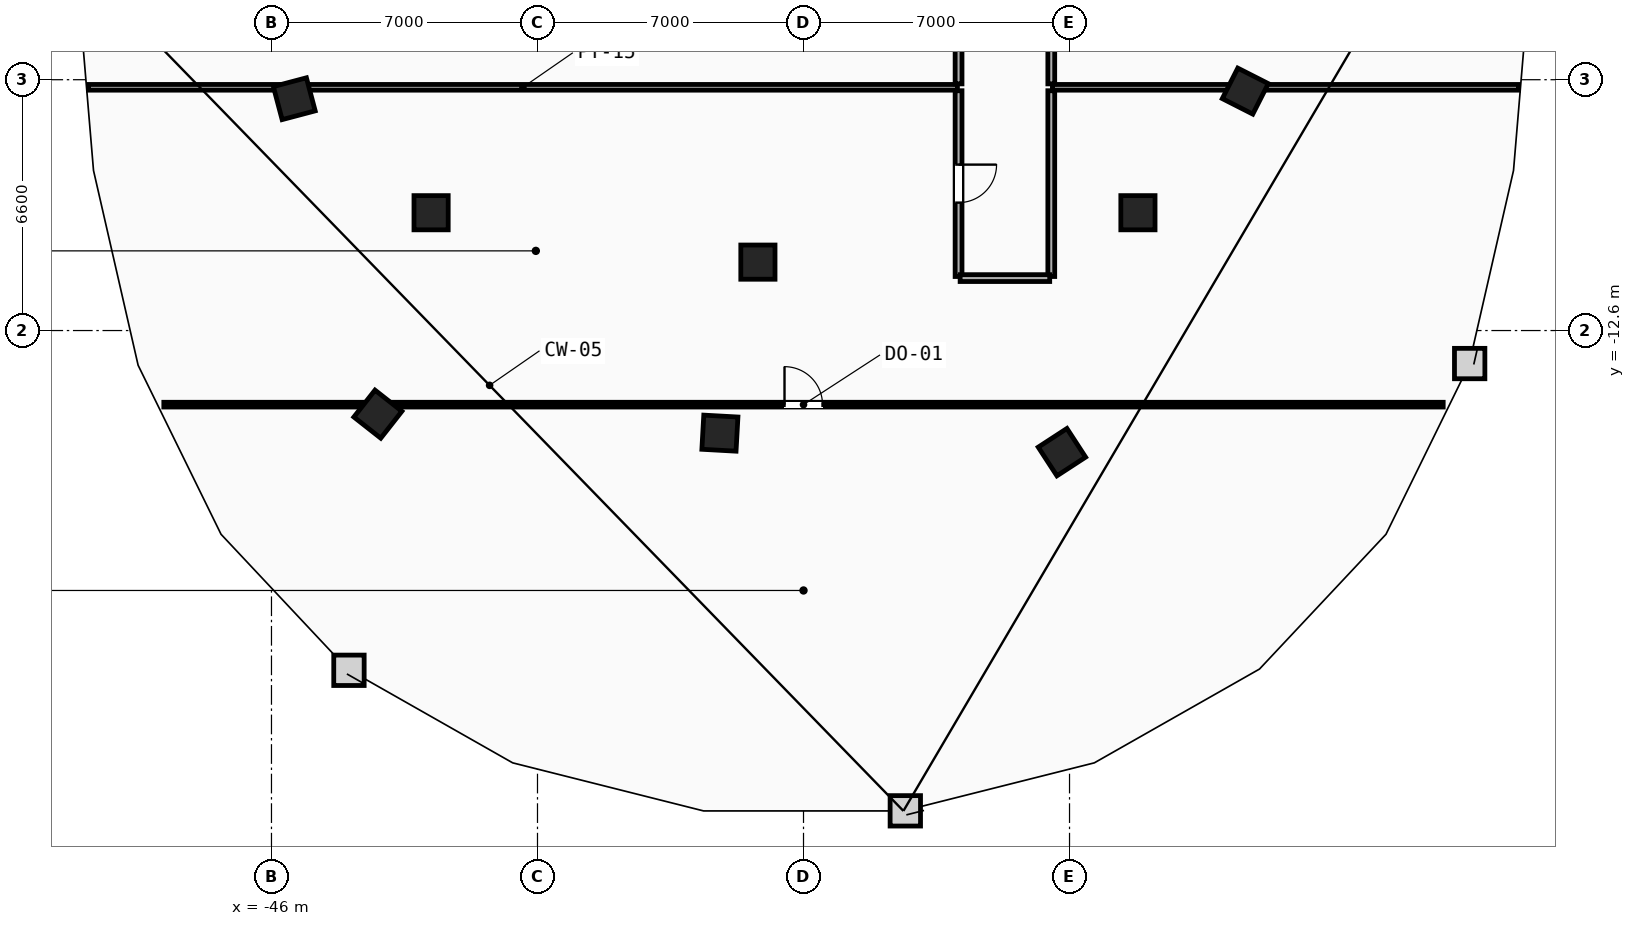
"""IFC4 building model, lengths in metres.
Left out: names, types, materials, properties, quantities, classifications, styles, units other than length and angle.
Written with IfcOpenShell. Run it as: python <this file> out.ifc"""

import sys

from ifc_helpers import new_model, si_unit, direction, frame, frame_2d, origin, origin_2d, place, context, subcontext, project, spatial, rectangle, extrude, element, fill, save


model = new_model("IFC4")
c1 = context("Model", 3, precision=1e-05, world=origin(), true_north=direction((0.0, 1.0)))
c2 = subcontext(c1, "Body", "Model", "MODEL_VIEW")
j1 = project(units=[si_unit("LENGTHUNIT", "METRE"), si_unit("PLANEANGLEUNIT", "RADIAN")], contexts=[c1])
p1 = place(None, origin())
s1 = spatial("IfcSite", under=j1, at=p1, CompositionType="ELEMENT")
p2 = place(p1, origin())
s2 = spatial("IfcBuilding", under=s1, at=p2, CompositionType="ELEMENT")
p3 = place(p2, frame((0.0, 0.0, 220.6)))
s3 = spatial("IfcBuildingStorey", under=s2, at=p3, CompositionType="ELEMENT", Elevation=220.6)
for number, where, z_axis, x_axis in (
    (1, (-41.8, -9.5, 0.0), (0.0, 0.0, 1.0), (1.0, 0.0, 0.0)),
    (2, (-33.2, -10.8, 0.0), (0.0, 0.0, 1.0), (1.0, 0.0, 0.0)),
    (3, (-23.2, -9.5, 0.0), (0.0, 0.0, 1.0), (1.0, 0.0, 0.0)),
    (4, (-45.4, -6.5, 0.0), (0.0, 0.0, 1.0), (0.256, -0.967, 0.0)),
    (5, (-43.2, -14.8, 0.0), (0.0, 0.0, 1.0), (0.786, -0.618, 0.0)),
    (6, (-34.2, -15.3, 0.0), (0.0, 0.0, 1.0), (0.998, -0.055, 0.0)),
    (7, (-25.2, -15.8, 0.0), (0.0, 0.0, 1.0), (0.838, 0.546, 0.0)),
    (8, (-20.375, -6.3, 0.0), (0.0, 0.0, 1.0), (0.453, 0.892, 0.0)),
):
    element("IfcColumn", number, at=place(p3, frame(where, z_axis=z_axis, x_axis=x_axis)), inside=s3, PredefinedType="COLUMN", context=c2, shape_type="SweptSolid", body=[
        extrude(rectangle(XDim=0.9, YDim=0.9, at=origin_2d()), origin(), (0.0, 0.0, 1.0), 3.6),
    ])
p4 = place(p3, frame((-50.817, -6.2, 0.0), z_axis=(0.0, 0.0, 1.0), x_axis=(1.0, 0.0, 0.0)))
e9 = element("IfcWall", 9, at=p4, inside=s3, PredefinedType="PARTITIONING", context=c2, shape_type="SweptSolid", body=[
    extrude(rectangle(XDim=22.867, YDim=0.15, at=frame_2d((11.434, 0.0))), origin(), (0.0, 0.0, 1.0), 3.34),
])
p5 = place(p3, frame((-25.45, -6.2, 0.0), z_axis=(0.0, 0.0, 1.0), x_axis=(1.0, 0.0, 0.0)))
e10 = element("IfcWall", 10, at=p5, inside=s3, PredefinedType="PARTITIONING", context=c2, shape_type="SweptSolid", body=[
    extrude(rectangle(XDim=12.267, YDim=0.15, at=frame_2d((6.133, 0.0))), origin(), (0.0, 0.0, 1.0), 3.34),
])
p6 = place(p3, frame((-27.92, -6.29, 0.0), z_axis=(0.0, 0.0, 1.0), x_axis=(0.0, -1.0, 0.0)))
e11 = element("IfcWall", 11, at=p6, inside=s3, PredefinedType="PARTITIONING", context=c2, shape_type="SweptSolid", body=[
    extrude(rectangle(XDim=4.888, YDim=0.18, at=frame_2d((2.444, 0.0))), origin(), (0.0, 0.0, 1.0), 3.34),
])
p7 = place(p6, frame((1.944, 0.0, 0.0)))
e12 = element("IfcOpeningElement", 12, at=p7, cuts=e11, PredefinedType="OPENING", context=c2, shape_type="SweptSolid", body=[
    extrude(rectangle(XDim=1.0, YDim=2.15, at=frame_2d((0.5, 1.075))), frame((0.0, 0.1, 0.0), z_axis=(0.0, -1.0, 0.0), x_axis=(1.0, 0.0, 0.0)), (0.0, 0.0, 1.0), 0.2),
])
p8 = place(p3, frame((-25.48, -11.178, 0.0), z_axis=(0.0, 0.0, 1.0), x_axis=(0.0, 1.0, 0.0)))
e13 = element("IfcWall", 13, at=p8, inside=s3, PredefinedType="PARTITIONING", context=c2, shape_type="SweptSolid", body=[
    extrude(rectangle(XDim=4.888, YDim=0.18, at=frame_2d((2.444, 0.0))), origin(), (0.0, 0.0, 1.0), 3.34),
])
p9 = place(p3, frame((-27.878, -11.22, 0.0), z_axis=(0.0, 0.0, 1.0), x_axis=(1.0, 0.0, 0.0)))
e14 = element("IfcWall", 14, at=p9, inside=s3, PredefinedType="PARTITIONING", context=c2, shape_type="SweptSolid", body=[
    extrude(rectangle(XDim=2.357, YDim=0.18, at=frame_2d((1.178, 0.0))), origin(), (0.0, 0.0, 1.0), 3.34),
])
p10 = place(p3, frame((-27.92, -0.45, 0.0), z_axis=(0.0, 0.0, 1.0), x_axis=(0.0, -1.0, 0.0)))
e15 = element("IfcWall", 15, at=p10, inside=s3, PredefinedType="PARTITIONING", context=c2, shape_type="SweptSolid", body=[
    extrude(rectangle(XDim=5.66, YDim=0.18, at=frame_2d((2.83, 0.0))), origin(), (0.0, 0.0, 1.0), 3.34),
])
p11 = place(p10, frame((2.33, 0.0, 0.0)))
e16 = element("IfcOpeningElement", 16, at=p11, cuts=e15, PredefinedType="OPENING", context=c2, shape_type="SweptSolid", body=[
    extrude(rectangle(XDim=1.0, YDim=2.15, at=frame_2d((0.5, 1.075))), frame((0.0, 0.1, 0.0), z_axis=(0.0, -1.0, 0.0), x_axis=(1.0, 0.0, 0.0)), (0.0, 0.0, 1.0), 0.2),
])
p12 = place(p3, frame((-25.48, -6.11, 0.0), z_axis=(0.0, 0.0, 1.0), x_axis=(0.0, 1.0, 0.0)))
e17 = element("IfcWall", 17, at=p12, inside=s3, PredefinedType="PARTITIONING", context=c2, shape_type="SweptSolid", body=[
    extrude(rectangle(XDim=5.66, YDim=0.18, at=frame_2d((2.83, 0.0))), origin(), (0.0, 0.0, 1.0), 3.34),
])
p13 = place(p3, frame((-48.833, -14.55, 0.0), z_axis=(0.0, 0.0, 1.0), x_axis=(1.0, 0.0, 0.0)))
e18 = element("IfcWall", 18, at=p13, inside=s3, PredefinedType="PARTITIONING", context=c2, shape_type="SweptSolid", body=[
    extrude(rectangle(XDim=33.666, YDim=0.125, at=frame_2d((16.833, 0.0))), origin(), (0.0, 0.0, 1.0), 3.34),
])
p14 = place(p13, frame((16.333, 0.0, 0.0)))
e19 = element("IfcOpeningElement", 19, at=p14, cuts=e18, PredefinedType="OPENING", context=c2, shape_type="SweptSolid", body=[
    extrude(rectangle(XDim=1.0, YDim=2.15, at=frame_2d((0.5, 1.075))), frame((0.0, 0.073, 0.0), z_axis=(0.0, -1.0, 0.0), x_axis=(1.0, 0.0, 0.0)), (0.0, 0.0, 1.0), 0.145),
])
p15 = place(p14, origin())
e20 = element("IfcDoor", 20, at=p15, inside=s3, OperationType="SINGLE_SWING_LEFT", PredefinedType="DOOR", context=c2, shape_type="SweptSolid", body=[
    extrude(rectangle(XDim=1.0, YDim=2.15, at=frame_2d((0.5, 1.075))), frame((0.0, 0.025, 0.0), z_axis=(0.0, -1.0, 0.0), x_axis=(1.0, 0.0, 0.0)), (0.0, 0.0, 1.0), 0.05),
])
fill(e19, e20)
p16 = place(p7, origin())
e21 = element("IfcDoor", 21, at=p16, inside=s3, OperationType="SINGLE_SWING_LEFT", PredefinedType="DOOR", context=c2, shape_type="SweptSolid", body=[
    extrude(rectangle(XDim=1.0, YDim=2.15, at=frame_2d((0.5, 1.075))), frame((0.0, 0.025, 0.0), z_axis=(0.0, -1.0, 0.0), x_axis=(1.0, 0.0, 0.0)), (0.0, 0.0, 1.0), 0.05),
])
fill(e12, e21)
save(model, sys.argv[1])
